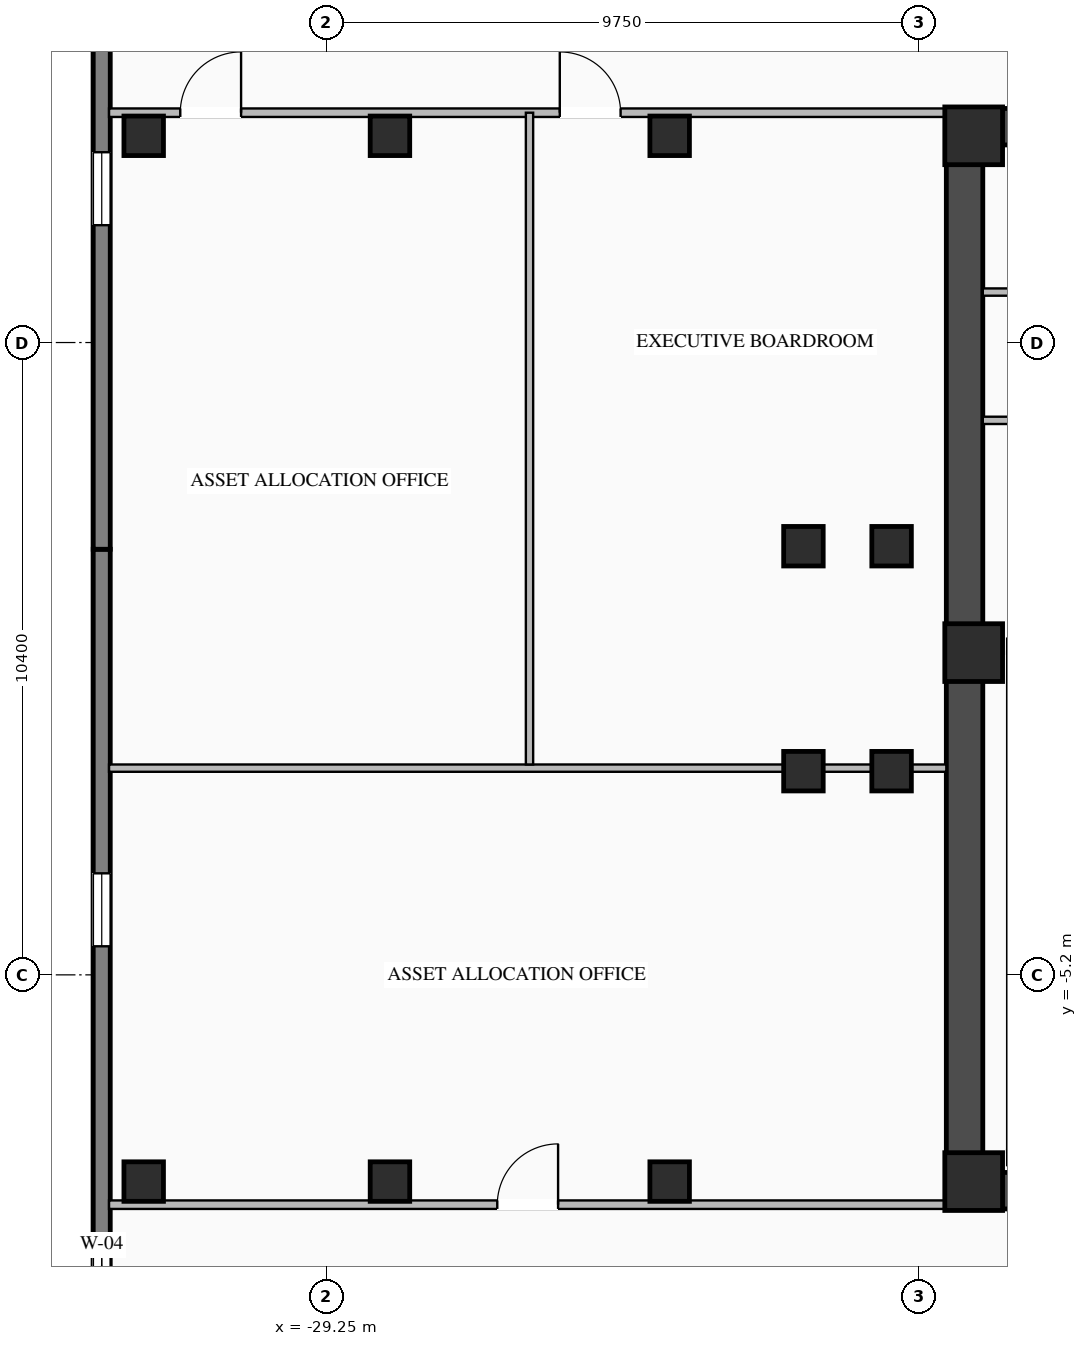
"""IFC4 building model, lengths in metres.
Left out: names, types, materials, properties, quantities, classifications, styles, units other than length and angle.
Written with IfcOpenShell. Run it as: python <this file> out.ifc"""

import sys

from ifc_helpers import new_model, si_unit, direction, frame, frame_2d, origin, origin_2d, place, context, subcontext, project, spatial, rectangle, i_section, extrude, element, fill, save


model = new_model("IFC4")
c1 = context("Model", 3, precision=1e-05, world=origin(), true_north=direction((0.0, 1.0)))
c2 = subcontext(c1, "Body", "Model", "MODEL_VIEW")
j1 = project(units=[si_unit("LENGTHUNIT", "METRE"), si_unit("PLANEANGLEUNIT", "RADIAN")], contexts=[c1])
p1 = place(None, origin())
s1 = spatial("IfcSite", under=j1, at=p1, CompositionType="ELEMENT")
p2 = place(p1, origin())
s2 = spatial("IfcBuilding", under=s1, at=p2, CompositionType="ELEMENT")
p3 = place(p2, frame((0.0, 0.0, 141.55)))
s3 = spatial("IfcBuildingStorey", under=s2, at=p3, CompositionType="ELEMENT", Elevation=141.55)
p4 = place(p3, frame((-19.05, -8.75, 0.0), z_axis=(0.0, 0.0, 1.0), x_axis=(1.0, 0.0, 0.0)))
e1 = element("IfcWall", 1, at=p4, inside=s3, PredefinedType="SHEAR", context=c2, shape_type="SweptSolid", body=[
    extrude(rectangle(XDim=10.25, YDim=0.6, at=frame_2d((5.125, 0.0))), origin(), (0.0, 0.0, 1.0), 3.27),
])
p5 = place(p3, frame((-19.05, 8.75, 0.0), z_axis=(0.0, 0.0, 1.0), x_axis=(1.0, 0.0, 0.0)))
e2 = element("IfcWall", 2, at=p5, inside=s3, PredefinedType="SHEAR", context=c2, shape_type="SweptSolid", body=[
    extrude(rectangle(XDim=10.25, YDim=0.6, at=frame_2d((5.125, 0.0))), origin(), (0.0, 0.0, 1.0), 3.27),
])
p6 = place(p5, frame((5.6, 0.0, 0.0)))
e3 = element("IfcOpeningElement", 3, at=p6, cuts=e2, PredefinedType="OPENING", context=c2, shape_type="SweptSolid", body=[
    extrude(rectangle(XDim=1.4, YDim=2.05, at=frame_2d((0.7, 1.025))), frame((0.0, 0.31, 0.0), z_axis=(0.0, -1.0, 0.0), x_axis=(1.0, 0.0, 0.0)), (0.0, 0.0, 1.0), 0.62),
])
p7 = place(p3, frame((-18.75, -8.45, 0.0), z_axis=(0.0, 0.0, 1.0), x_axis=(0.0, 1.0, 0.0)))
e4 = element("IfcWall", 4, at=p7, inside=s3, PredefinedType="SHEAR", context=c2, shape_type="SweptSolid", body=[
    extrude(rectangle(XDim=16.9, YDim=0.6, at=frame_2d((8.45, 0.0))), origin(), (0.0, 0.0, 1.0), 3.27),
])
for number, where, z_axis, x_axis in (
    (5, (-18.6, -8.6, 0.0), (0.0, 0.0, 1.0), (1.0, 0.0, 0.0)),
    (6, (-18.6, 0.1, 0.0), (0.0, 0.0, 1.0), (1.0, 0.0, 0.0)),
    (7, (-18.6, 8.6, 0.0), (0.0, 0.0, 1.0), (1.0, 0.0, 0.0)),
):
    element("IfcColumn", number, at=place(p3, frame(where, z_axis=z_axis, x_axis=x_axis)), inside=s3, PredefinedType="COLUMN", context=c2, shape_type="SweptSolid", body=[
        extrude(rectangle(XDim=0.95, YDim=0.95, at=origin_2d()), origin(), (0.0, 0.0, 1.0), 3.45),
    ])
for number, where, z_axis, x_axis in (
    (8, (-21.4, -1.85, 0.0), (0.0, 0.0, 1.0), (1.0, 0.0, 0.0)),
    (9, (-21.4, 1.85, 0.0), (0.0, 0.0, 1.0), (1.0, 0.0, 0.0)),
    (10, (-19.95, -1.85, 0.0), (0.0, 0.0, 1.0), (1.0, 0.0, 0.0)),
    (11, (-19.95, 1.85, 0.0), (0.0, 0.0, 1.0), (1.0, 0.0, 0.0)),
    (12, (-23.6, -8.6, 0.0), (0.0, 0.0, 1.0), (1.0, 0.0, 0.0)),
    (13, (-23.6, 8.6, 0.0), (0.0, 0.0, 1.0), (1.0, 0.0, 0.0)),
    (14, (-28.2, -8.6, 0.0), (0.0, 0.0, 1.0), (1.0, 0.0, 0.0)),
    (15, (-28.2, 8.6, 0.0), (0.0, 0.0, 1.0), (1.0, 0.0, 0.0)),
    (16, (-32.25, -8.6, 0.0), (0.0, 0.0, 1.0), (1.0, 0.0, 0.0)),
    (17, (-32.25, 8.6, 0.0), (0.0, 0.0, 1.0), (1.0, 0.0, 0.0)),
):
    element("IfcColumn", number, at=place(p3, frame(where, z_axis=z_axis, x_axis=x_axis)), inside=s3, PredefinedType="COLUMN", context=c2, shape_type="SweptSolid", body=[
        extrude(i_section(OverallWidth=0.65, OverallDepth=0.65, WebThickness=0.028, FlangeThickness=0.04, at=origin_2d()), origin(), (0.0, 0.0, 1.0), 3.45),
    ])
p8 = place(p3, frame((-32.94, -15.99, 0.0), z_axis=(0.0, 0.0, 1.0), x_axis=(0.0, 1.0, 0.0)))
e18 = element("IfcWall", 18, at=p8, inside=s3, PredefinedType="STANDARD", context=c2, shape_type="SweptSolid", body=[
    extrude(rectangle(XDim=17.79, YDim=0.28, at=frame_2d((8.895, 0.0))), origin(), (0.0, 0.0, 1.0), 3.25),
])
p9 = place(p8, frame((5.33, 0.0, 0.76)))
e19 = element("IfcOpeningElement", 19, at=p9, cuts=e18, PredefinedType="OPENING", context=c2, shape_type="SweptSolid", body=[
    extrude(rectangle(XDim=1.2, YDim=1.95, at=frame_2d((0.6, 0.975))), frame((0.0, 0.15, 0.0), z_axis=(0.0, -1.0, 0.0), x_axis=(1.0, 0.0, 0.0)), (0.0, 0.0, 1.0), 0.3),
])
p10 = place(p8, frame((11.26, 0.0, 0.76)))
e20 = element("IfcOpeningElement", 20, at=p10, cuts=e18, PredefinedType="OPENING", context=c2, shape_type="SweptSolid", body=[
    extrude(rectangle(XDim=1.2, YDim=1.95, at=frame_2d((0.6, 0.975))), frame((0.0, 0.15, 0.0), z_axis=(0.0, -1.0, 0.0), x_axis=(1.0, 0.0, 0.0)), (0.0, 0.0, 1.0), 0.3),
])
p11 = place(p3, frame((-32.94, 1.8, 0.0), z_axis=(0.0, 0.0, 1.0), x_axis=(0.0, 1.0, 0.0)))
e21 = element("IfcWall", 21, at=p11, inside=s3, PredefinedType="STANDARD", context=c2, shape_type="SweptSolid", body=[
    extrude(rectangle(XDim=17.79, YDim=0.28, at=frame_2d((8.895, 0.0))), origin(), (0.0, 0.0, 1.0), 3.25),
])
p12 = place(p11, frame((5.33, 0.0, 0.76)))
e22 = element("IfcOpeningElement", 22, at=p12, cuts=e21, PredefinedType="OPENING", context=c2, shape_type="SweptSolid", body=[
    extrude(rectangle(XDim=1.2, YDim=1.95, at=frame_2d((0.6, 0.975))), frame((0.0, 0.15, 0.0), z_axis=(0.0, -1.0, 0.0), x_axis=(1.0, 0.0, 0.0)), (0.0, 0.0, 1.0), 0.3),
])
p13 = place(p11, frame((11.26, 0.0, 0.76)))
e23 = element("IfcOpeningElement", 23, at=p13, cuts=e21, PredefinedType="OPENING", context=c2, shape_type="SweptSolid", body=[
    extrude(rectangle(XDim=1.2, YDim=1.95, at=frame_2d((0.6, 0.975))), frame((0.0, 0.15, 0.0), z_axis=(0.0, -1.0, 0.0), x_axis=(1.0, 0.0, 0.0)), (0.0, 0.0, 1.0), 0.3),
])
p14 = place(p3, frame((-18.45, 3.92, 0.0), z_axis=(0.0, 0.0, 1.0), x_axis=(1.0, 0.0, 0.0)))
e24 = element("IfcWall", 24, at=p14, inside=s3, PredefinedType="STANDARD", context=c2, shape_type="SweptSolid", body=[
    extrude(rectangle(XDim=4.55, YDim=0.12, at=frame_2d((2.275, 0.0))), origin(), (0.0, 0.0, 1.0), 3.25),
])
p15 = place(p3, frame((-18.45, 6.03, 0.0), z_axis=(0.0, 0.0, 1.0), x_axis=(1.0, 0.0, 0.0)))
e25 = element("IfcWall", 25, at=p15, inside=s3, PredefinedType="STANDARD", context=c2, shape_type="SweptSolid", body=[
    extrude(rectangle(XDim=2.3, YDim=0.12, at=frame_2d((1.15, 0.0))), origin(), (0.0, 0.0, 1.0), 3.25),
])
p16 = place(p3, frame((-32.82, 8.98, 0.0), z_axis=(0.0, 0.0, 1.0), x_axis=(1.0, 0.0, 0.0)))
e26 = element("IfcWall", 26, at=p16, inside=s3, PredefinedType="STANDARD", context=c2, shape_type="SweptSolid", body=[
    extrude(rectangle(XDim=13.77, YDim=0.14, at=frame_2d((6.885, 0.0))), origin(), (0.0, 0.0, 1.0), 3.25),
])
p17 = place(p16, frame((1.171, 0.0, 0.0)))
e27 = element("IfcOpeningElement", 27, at=p17, cuts=e26, PredefinedType="OPENING", context=c2, shape_type="SweptSolid", body=[
    extrude(rectangle(XDim=1.0, YDim=2.08, at=frame_2d((0.5, 1.04))), frame((0.0, 0.08, 0.0), z_axis=(0.0, -1.0, 0.0), x_axis=(1.0, 0.0, 0.0)), (0.0, 0.0, 1.0), 0.16),
])
p18 = place(p16, frame((7.413, 0.0, 0.0)))
e28 = element("IfcOpeningElement", 28, at=p18, cuts=e26, PredefinedType="OPENING", context=c2, shape_type="SweptSolid", body=[
    extrude(rectangle(XDim=1.0, YDim=2.08, at=frame_2d((0.5, 1.04))), frame((0.0, 0.08, 0.0), z_axis=(0.0, -1.0, 0.0), x_axis=(1.0, 0.0, 0.0)), (0.0, 0.0, 1.0), 0.16),
])
p19 = place(p3, frame((-32.82, -8.98, 0.0), z_axis=(0.0, 0.0, 1.0), x_axis=(1.0, 0.0, 0.0)))
e29 = element("IfcWall", 29, at=p19, inside=s3, PredefinedType="STANDARD", context=c2, shape_type="SweptSolid", body=[
    extrude(rectangle(XDim=13.77, YDim=0.14, at=frame_2d((6.885, 0.0))), origin(), (0.0, 0.0, 1.0), 3.25),
])
p20 = place(p19, frame((6.385, 0.0, 0.0)))
e30 = element("IfcOpeningElement", 30, at=p20, cuts=e29, PredefinedType="OPENING", context=c2, shape_type="SweptSolid", body=[
    extrude(rectangle(XDim=1.0, YDim=2.08, at=frame_2d((0.5, 1.04))), frame((0.0, 0.08, 0.0), z_axis=(0.0, -1.0, 0.0), x_axis=(1.0, 0.0, 0.0)), (0.0, 0.0, 1.0), 0.16),
])
p21 = place(p3, frame((-32.82, -1.8, 0.0), z_axis=(0.0, 0.0, 1.0), x_axis=(1.0, 0.0, 0.0)))
e31 = element("IfcWall", 31, at=p21, inside=s3, PredefinedType="STANDARD", context=c2, shape_type="SweptSolid", body=[
    extrude(rectangle(XDim=13.77, YDim=0.12, at=frame_2d((6.885, 0.0))), origin(), (0.0, 0.0, 1.0), 3.25),
])
p22 = place(p3, frame((-25.905, -1.74, 0.0), z_axis=(0.0, 0.0, 1.0), x_axis=(0.0, 1.0, 0.0)))
e32 = element("IfcWall", 32, at=p22, inside=s3, PredefinedType="STANDARD", context=c2, shape_type="SweptSolid", body=[
    extrude(rectangle(XDim=10.72, YDim=0.12, at=frame_2d((5.36, 0.0))), origin(), (0.0, 0.0, 1.0), 3.25),
])
p23 = place(p9, origin())
e33 = element("IfcWindow", 33, at=p23, inside=s3, PartitioningType="SINGLE_PANEL", PredefinedType="WINDOW", context=c2, shape_type="SweptSolid", body=[
    extrude(rectangle(XDim=1.2, YDim=1.95, at=frame_2d((0.6, 0.975))), frame((0.0, 0.03, 0.0), z_axis=(0.0, -1.0, 0.0), x_axis=(1.0, 0.0, 0.0)), (0.0, 0.0, 1.0), 0.06),
])
fill(e19, e33)
p24 = place(p10, origin())
e34 = element("IfcWindow", 34, at=p24, inside=s3, PartitioningType="SINGLE_PANEL", PredefinedType="WINDOW", context=c2, shape_type="SweptSolid", body=[
    extrude(rectangle(XDim=1.2, YDim=1.95, at=frame_2d((0.6, 0.975))), frame((0.0, 0.03, 0.0), z_axis=(0.0, -1.0, 0.0), x_axis=(1.0, 0.0, 0.0)), (0.0, 0.0, 1.0), 0.06),
])
fill(e20, e34)
p25 = place(p12, origin())
e35 = element("IfcWindow", 35, at=p25, inside=s3, PartitioningType="SINGLE_PANEL", PredefinedType="WINDOW", context=c2, shape_type="SweptSolid", body=[
    extrude(rectangle(XDim=1.2, YDim=1.95, at=frame_2d((0.6, 0.975))), frame((0.0, 0.03, 0.0), z_axis=(0.0, -1.0, 0.0), x_axis=(1.0, 0.0, 0.0)), (0.0, 0.0, 1.0), 0.06),
])
fill(e22, e35)
p26 = place(p17, origin())
e36 = element("IfcDoor", 36, at=p26, inside=s3, OperationType="SINGLE_SWING_RIGHT", PredefinedType="DOOR", context=c2, shape_type="SweptSolid", body=[
    extrude(rectangle(XDim=1.0, YDim=2.08, at=frame_2d((0.5, 1.04))), frame((0.0, 0.025, 0.0), z_axis=(0.0, -1.0, 0.0), x_axis=(1.0, 0.0, 0.0)), (0.0, 0.0, 1.0), 0.05),
])
fill(e27, e36)
p27 = place(p18, origin())
e37 = element("IfcDoor", 37, at=p27, inside=s3, OperationType="SINGLE_SWING_LEFT", PredefinedType="DOOR", context=c2, shape_type="SweptSolid", body=[
    extrude(rectangle(XDim=1.0, YDim=2.08, at=frame_2d((0.5, 1.04))), frame((0.0, 0.025, 0.0), z_axis=(0.0, -1.0, 0.0), x_axis=(1.0, 0.0, 0.0)), (0.0, 0.0, 1.0), 0.05),
])
fill(e28, e37)
p28 = place(p20, origin())
e38 = element("IfcDoor", 38, at=p28, inside=s3, OperationType="SINGLE_SWING_RIGHT", PredefinedType="DOOR", context=c2, shape_type="SweptSolid", body=[
    extrude(rectangle(XDim=1.0, YDim=2.08, at=frame_2d((0.5, 1.04))), frame((0.0, 0.025, 0.0), z_axis=(0.0, -1.0, 0.0), x_axis=(1.0, 0.0, 0.0)), (0.0, 0.0, 1.0), 0.05),
])
fill(e30, e38)
save(model, sys.argv[1])
